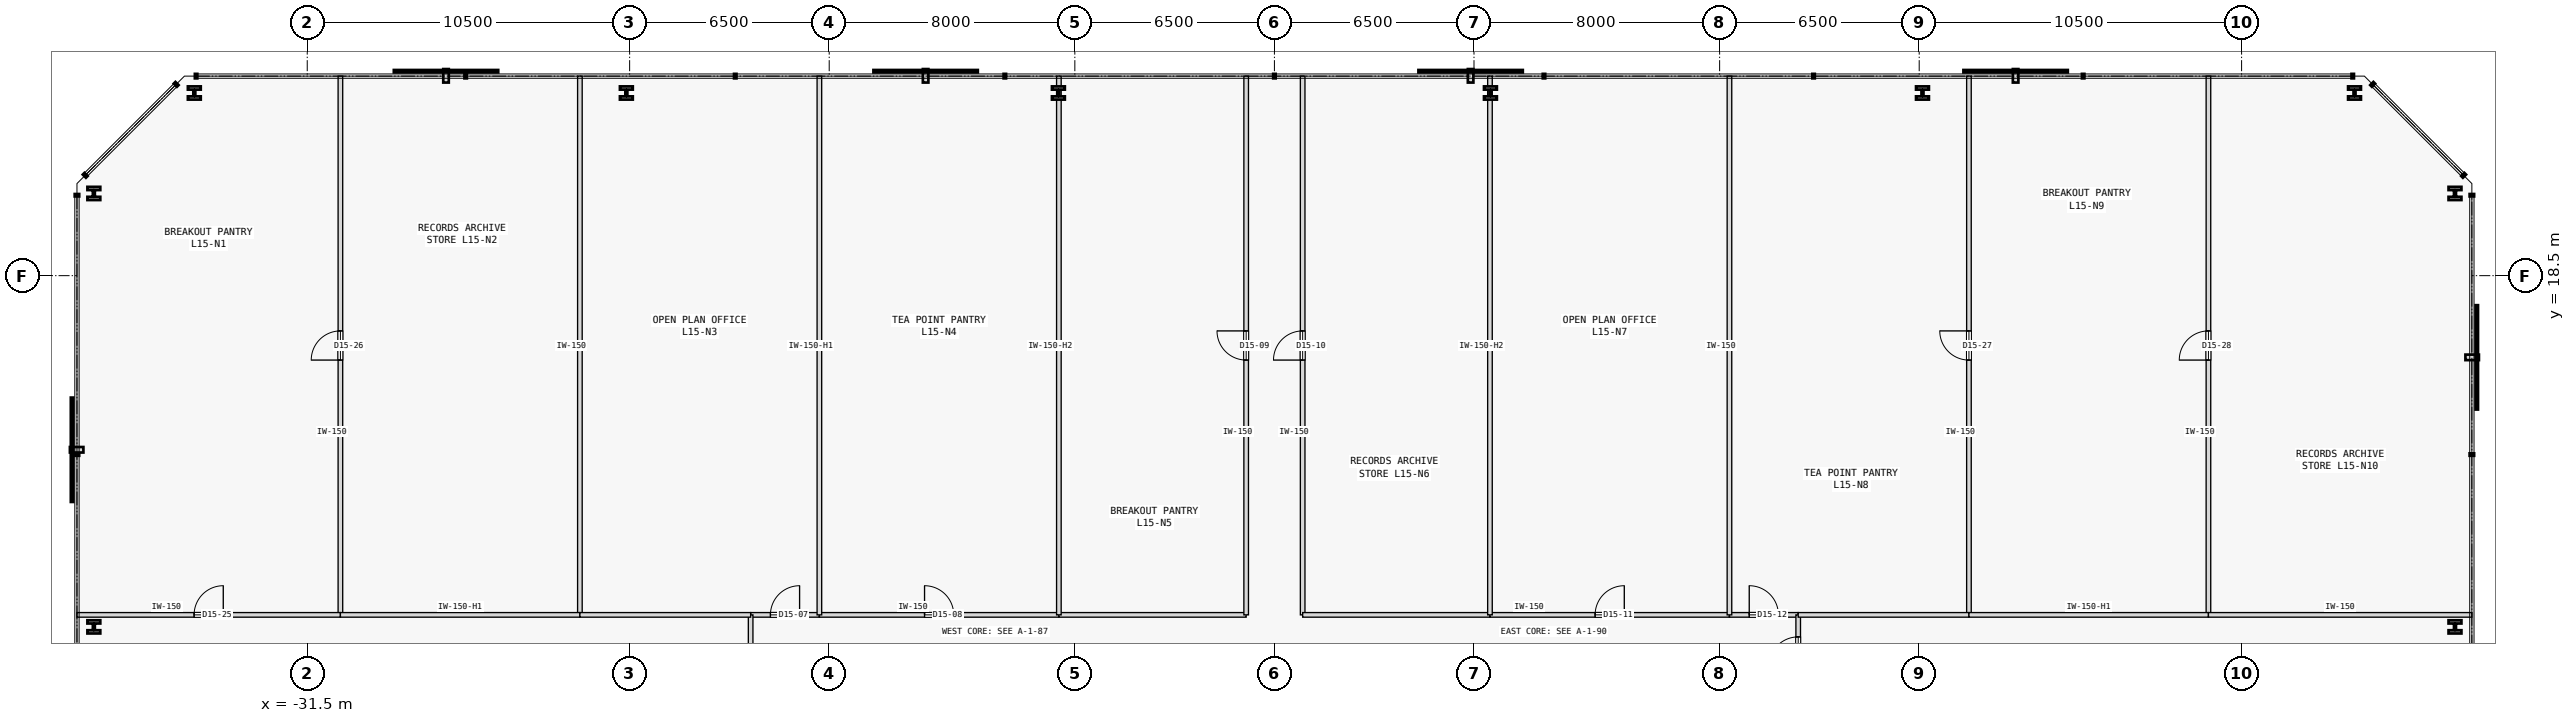
"""IFC4 building model, lengths in metres.
Left out: names, types, materials, properties, quantities, classifications, styles, units other than length and angle.
Written with IfcOpenShell. Run it as: python <this file> out.ifc"""

import sys

from ifc_helpers import new_model, si_unit, direction, frame, frame_2d, origin, origin_2d, place, context, subcontext, project, spatial, rectangle, i_section, extrude, element, fill, save


model = new_model("IFC4")
c1 = context("Model", 3, precision=1e-05, world=origin(), true_north=direction((0.0, 1.0)))
c2 = subcontext(c1, "Body", "Model", "MODEL_VIEW")
j1 = project(units=[si_unit("LENGTHUNIT", "METRE"), si_unit("PLANEANGLEUNIT", "RADIAN")], contexts=[c1])
p1 = place(None, origin())
s1 = spatial("IfcSite", under=j1, at=p1, CompositionType="ELEMENT")
p2 = place(p1, origin())
s2 = spatial("IfcBuilding", under=s1, at=p2, CompositionType="ELEMENT")
p3 = place(p2, frame((0.0, 0.0, 63.6)))
s3 = spatial("IfcBuildingStorey", under=s2, at=p3, CompositionType="ELEMENT", Elevation=63.6)
for number, where, z_axis, x_axis in (
    (1, (38.45, 7.059, 0.0), (0.0, 0.0, 1.0), (1.0, 0.0, 0.0)),
    (2, (38.45, 21.178, 0.0), (0.0, 0.0, 1.0), (1.0, 0.0, 0.0)),
    (3, (35.178, 24.45, 0.0), (0.0, 0.0, 1.0), (1.0, 0.0, 0.0)),
    (4, (21.107, 24.45, 0.0), (0.0, 0.0, 1.0), (1.0, 0.0, 0.0)),
    (5, (7.036, 24.45, 0.0), (0.0, 0.0, 1.0), (1.0, 0.0, 0.0)),
    (6, (-7.036, 24.45, 0.0), (0.0, 0.0, 1.0), (1.0, 0.0, 0.0)),
    (7, (-21.107, 24.45, 0.0), (0.0, 0.0, 1.0), (1.0, 0.0, 0.0)),
    (8, (-35.178, 24.45, 0.0), (0.0, 0.0, 1.0), (1.0, 0.0, 0.0)),
    (9, (-38.45, 21.178, 0.0), (0.0, 0.0, 1.0), (1.0, 0.0, 0.0)),
    (10, (-38.45, 7.059, 0.0), (0.0, 0.0, 1.0), (1.0, 0.0, 0.0)),
):
    element("IfcColumn", number, at=place(p3, frame(where, z_axis=z_axis, x_axis=x_axis)), inside=s3, PredefinedType="COLUMN", context=c2, shape_type="SweptSolid", body=[
        extrude(i_section(OverallWidth=0.42, OverallDepth=0.431, WebThickness=0.065, FlangeThickness=0.106, FilletRadius=0.015, at=origin_2d()), origin(), (0.0, 0.0, 1.0), 3.8),
    ])
p4 = place(p3, frame((-17.059, 7.45, 0.0), z_axis=(0.0, 0.0, 1.0), x_axis=(1.0, 0.0, 0.0)))
e11 = element("IfcWall", 11, at=p4, inside=s3, PredefinedType="PARTITIONING", context=c2, shape_type="SweptSolid", body=[
    extrude(rectangle(XDim=2.239, YDim=0.15, at=frame_2d((1.12, 0.0))), origin(), (0.0, 0.0, 1.0), 3.575),
])
p5 = place(p4, frame((0.645, 0.0, 0.0)))
e12 = element("IfcOpeningElement", 12, at=p5, cuts=e11, PredefinedType="OPENING", context=c2, shape_type="SweptSolid", body=[
    extrude(rectangle(XDim=0.95, YDim=2.15, at=frame_2d((0.475, 1.075))), frame((0.0, 0.085, 0.0), z_axis=(0.0, -1.0, 0.0), x_axis=(1.0, 0.0, 0.0)), (0.0, 0.0, 1.0), 0.17),
])
p6 = place(p3, frame((-14.82, 7.45, 0.0), z_axis=(0.0, 0.0, 1.0), x_axis=(1.0, 0.0, 0.0)))
e13 = element("IfcWall", 13, at=p6, inside=s3, PredefinedType="PARTITIONING", context=c2, shape_type="SweptSolid", body=[
    extrude(rectangle(XDim=7.8, YDim=0.15, at=frame_2d((3.9, 0.0))), origin(), (0.0, 0.0, 1.0), 3.575),
])
p7 = place(p6, frame((3.425, 0.0, 0.0)))
e14 = element("IfcOpeningElement", 14, at=p7, cuts=e13, PredefinedType="OPENING", context=c2, shape_type="SweptSolid", body=[
    extrude(rectangle(XDim=0.95, YDim=2.15, at=frame_2d((0.475, 1.075))), frame((0.0, 0.085, 0.0), z_axis=(0.0, -1.0, 0.0), x_axis=(1.0, 0.0, 0.0)), (0.0, 0.0, 1.0), 0.17),
])
p8 = place(p3, frame((-7.02, 7.45, 0.0), z_axis=(0.0, 0.0, 1.0), x_axis=(1.0, 0.0, 0.0)))
e15 = element("IfcWall", 15, at=p8, inside=s3, PredefinedType="PARTITIONING", context=c2, shape_type="SweptSolid", body=[
    extrude(rectangle(XDim=6.1, YDim=0.15, at=frame_2d((3.05, 0.0))), origin(), (0.0, 0.0, 1.0), 3.575),
])
p9 = place(p3, frame((-0.92, 7.45, 0.0), z_axis=(0.0, 0.0, 1.0), x_axis=(0.0, 1.0, 0.0)))
e16 = element("IfcWall", 16, at=p9, inside=s3, PredefinedType="PARTITIONING", context=c2, shape_type="SweptSolid", body=[
    extrude(rectangle(XDim=17.55, YDim=0.15, at=frame_2d((8.775, 0.0))), origin(), (0.0, 0.0, 1.0), 3.575),
])
p10 = place(p9, frame((8.3, 0.0, 0.0)))
e17 = element("IfcOpeningElement", 17, at=p10, cuts=e16, PredefinedType="OPENING", context=c2, shape_type="SweptSolid", body=[
    extrude(rectangle(XDim=0.95, YDim=2.15, at=frame_2d((0.475, 1.075))), frame((0.0, 0.085, 0.0), z_axis=(0.0, -1.0, 0.0), x_axis=(1.0, 0.0, 0.0)), (0.0, 0.0, 1.0), 0.17),
])
p11 = place(p3, frame((0.92, 7.45, 0.0), z_axis=(0.0, 0.0, 1.0), x_axis=(0.0, 1.0, 0.0)))
e18 = element("IfcWall", 18, at=p11, inside=s3, PredefinedType="PARTITIONING", context=c2, shape_type="SweptSolid", body=[
    extrude(rectangle(XDim=17.55, YDim=0.15, at=frame_2d((8.775, 0.0))), origin(), (0.0, 0.0, 1.0), 3.575),
])
p12 = place(p11, frame((8.3, 0.0, 0.0)))
e19 = element("IfcOpeningElement", 19, at=p12, cuts=e18, PredefinedType="OPENING", context=c2, shape_type="SweptSolid", body=[
    extrude(rectangle(XDim=0.95, YDim=2.15, at=frame_2d((0.475, 1.075))), frame((0.0, 0.085, 0.0), z_axis=(0.0, -1.0, 0.0), x_axis=(1.0, 0.0, 0.0)), (0.0, 0.0, 1.0), 0.17),
])
p13 = place(p3, frame((0.92, 7.45, 0.0), z_axis=(0.0, 0.0, 1.0), x_axis=(1.0, 0.0, 0.0)))
e20 = element("IfcWall", 20, at=p13, inside=s3, PredefinedType="PARTITIONING", context=c2, shape_type="SweptSolid", body=[
    extrude(rectangle(XDim=6.1, YDim=0.15, at=frame_2d((3.05, 0.0))), origin(), (0.0, 0.0, 1.0), 3.575),
])
p14 = place(p3, frame((7.02, 7.45, 0.0), z_axis=(0.0, 0.0, 1.0), x_axis=(1.0, 0.0, 0.0)))
e21 = element("IfcWall", 21, at=p14, inside=s3, PredefinedType="PARTITIONING", context=c2, shape_type="SweptSolid", body=[
    extrude(rectangle(XDim=7.8, YDim=0.15, at=frame_2d((3.9, 0.0))), origin(), (0.0, 0.0, 1.0), 3.575),
])
p15 = place(p14, frame((3.425, 0.0, 0.0)))
e22 = element("IfcOpeningElement", 22, at=p15, cuts=e21, PredefinedType="OPENING", context=c2, shape_type="SweptSolid", body=[
    extrude(rectangle(XDim=0.95, YDim=2.15, at=frame_2d((0.475, 1.075))), frame((0.0, 0.085, 0.0), z_axis=(0.0, -1.0, 0.0), x_axis=(1.0, 0.0, 0.0)), (0.0, 0.0, 1.0), 0.17),
])
p16 = place(p3, frame((14.82, 7.45, 0.0), z_axis=(0.0, 0.0, 1.0), x_axis=(1.0, 0.0, 0.0)))
e23 = element("IfcWall", 23, at=p16, inside=s3, PredefinedType="PARTITIONING", context=c2, shape_type="SweptSolid", body=[
    extrude(rectangle(XDim=2.239, YDim=0.15, at=frame_2d((1.12, 0.0))), origin(), (0.0, 0.0, 1.0), 3.575),
])
p17 = place(p16, frame((0.645, 0.0, 0.0)))
e24 = element("IfcOpeningElement", 24, at=p17, cuts=e23, PredefinedType="OPENING", context=c2, shape_type="SweptSolid", body=[
    extrude(rectangle(XDim=0.95, YDim=2.15, at=frame_2d((0.475, 1.075))), frame((0.0, 0.085, 0.0), z_axis=(0.0, -1.0, 0.0), x_axis=(1.0, 0.0, 0.0)), (0.0, 0.0, 1.0), 0.17),
])
p18 = place(p3, frame((-17.059, 0.92, 0.0), z_axis=(0.0, 0.0, 1.0), x_axis=(0.0, 1.0, 0.0)))
e25 = element("IfcWall", 25, at=p18, inside=s3, PredefinedType="PARTITIONING", context=c2, shape_type="SweptSolid", body=[
    extrude(rectangle(XDim=6.53, YDim=0.15, at=frame_2d((3.265, 0.0))), origin(), (0.0, 0.0, 1.0), 3.575),
])
p19 = place(p3, frame((17.059, 5.066, 0.0), z_axis=(0.0, 0.0, 1.0), x_axis=(0.0, 1.0, 0.0)))
e26 = element("IfcWall", 26, at=p19, inside=s3, PredefinedType="PARTITIONING", context=c2, shape_type="SweptSolid", body=[
    extrude(rectangle(XDim=2.384, YDim=0.15, at=frame_2d((1.192, 0.0))), origin(), (0.0, 0.0, 1.0), 3.575),
])
p20 = place(p19, frame((0.717, 0.0, 0.0)))
e27 = element("IfcOpeningElement", 27, at=p20, cuts=e26, PredefinedType="OPENING", context=c2, shape_type="SweptSolid", body=[
    extrude(rectangle(XDim=0.95, YDim=2.15, at=frame_2d((0.475, 1.075))), frame((0.0, 0.085, 0.0), z_axis=(0.0, -1.0, 0.0), x_axis=(1.0, 0.0, 0.0)), (0.0, 0.0, 1.0), 0.17),
])
p21 = place(p3, frame((-30.42, 7.45, 0.0), z_axis=(0.0, 0.0, 1.0), x_axis=(0.0, 1.0, 0.0)))
e28 = element("IfcWall", 28, at=p21, inside=s3, PredefinedType="PARTITIONING", context=c2, shape_type="SweptSolid", body=[
    extrude(rectangle(XDim=17.55, YDim=0.15, at=frame_2d((8.775, 0.0))), origin(), (0.0, 0.0, 1.0), 3.575),
])
p22 = place(p21, frame((8.3, 0.0, 0.0)))
e29 = element("IfcOpeningElement", 29, at=p22, cuts=e28, PredefinedType="OPENING", context=c2, shape_type="SweptSolid", body=[
    extrude(rectangle(XDim=0.95, YDim=2.15, at=frame_2d((0.475, 1.075))), frame((0.0, 0.085, 0.0), z_axis=(0.0, -1.0, 0.0), x_axis=(1.0, 0.0, 0.0)), (0.0, 0.0, 1.0), 0.17),
])
p23 = place(p3, frame((-39.0, 7.45, 0.0), z_axis=(0.0, 0.0, 1.0), x_axis=(1.0, 0.0, 0.0)))
e30 = element("IfcWall", 30, at=p23, inside=s3, PredefinedType="PARTITIONING", context=c2, shape_type="SweptSolid", body=[
    extrude(rectangle(XDim=8.58, YDim=0.15, at=frame_2d((4.29, 0.0))), origin(), (0.0, 0.0, 1.0), 3.575),
])
p24 = place(p23, frame((3.815, 0.0, 0.0)))
e31 = element("IfcOpeningElement", 31, at=p24, cuts=e30, PredefinedType="OPENING", context=c2, shape_type="SweptSolid", body=[
    extrude(rectangle(XDim=0.95, YDim=2.15, at=frame_2d((0.475, 1.075))), frame((0.0, 0.085, 0.0), z_axis=(0.0, -1.0, 0.0), x_axis=(1.0, 0.0, 0.0)), (0.0, 0.0, 1.0), 0.17),
])
p25 = place(p3, frame((-22.62, 7.45, 0.0), z_axis=(0.0, 0.0, 1.0), x_axis=(0.0, 1.0, 0.0)))
e32 = element("IfcWall", 32, at=p25, inside=s3, PredefinedType="PARTITIONING", context=c2, shape_type="SweptSolid", body=[
    extrude(rectangle(XDim=17.55, YDim=0.15, at=frame_2d((8.775, 0.0))), origin(), (0.0, 0.0, 1.0), 3.575),
])
p26 = place(p3, frame((-30.42, 7.45, 0.0), z_axis=(0.0, 0.0, 1.0), x_axis=(1.0, 0.0, 0.0)))
e33 = element("IfcWall", 33, at=p26, inside=s3, PredefinedType="PARTITIONING", context=c2, shape_type="SweptSolid", body=[
    extrude(rectangle(XDim=7.8, YDim=0.15, at=frame_2d((3.9, 0.0))), origin(), (0.0, 0.0, 1.0), 3.125),
])
p27 = place(p3, frame((-14.82, 7.45, 0.0), z_axis=(0.0, 0.0, 1.0), x_axis=(0.0, 1.0, 0.0)))
e34 = element("IfcWall", 34, at=p27, inside=s3, PredefinedType="PARTITIONING", context=c2, shape_type="SweptSolid", body=[
    extrude(rectangle(XDim=17.55, YDim=0.15, at=frame_2d((8.775, 0.0))), origin(), (0.0, 0.0, 1.0), 3.125),
])
p28 = place(p3, frame((-22.62, 7.45, 0.0), z_axis=(0.0, 0.0, 1.0), x_axis=(1.0, 0.0, 0.0)))
e35 = element("IfcWall", 35, at=p28, inside=s3, PredefinedType="PARTITIONING", context=c2, shape_type="SweptSolid", body=[
    extrude(rectangle(XDim=5.561, YDim=0.15, at=frame_2d((2.781, 0.0))), origin(), (0.0, 0.0, 1.0), 3.575),
])
for number, where, z_axis, x_axis in (
    (36, (-7.02, 7.45, 0.0), (0.0, 0.0, 1.0), (0.0, 1.0, 0.0)),
    (37, (7.02, 7.45, 0.0), (0.0, 0.0, 1.0), (0.0, 1.0, 0.0)),
):
    element("IfcWall", number, at=place(p3, frame(where, z_axis=z_axis, x_axis=x_axis)), inside=s3, PredefinedType="PARTITIONING", context=c2, shape_type="SweptSolid", body=[
        extrude(rectangle(XDim=17.55, YDim=0.15, at=frame_2d((8.775, 0.0))), origin(), (0.0, 0.0, 1.0), 2.975),
    ])
p29 = place(p3, frame((14.82, 7.45, 0.0), z_axis=(0.0, 0.0, 1.0), x_axis=(0.0, 1.0, 0.0)))
e38 = element("IfcWall", 38, at=p29, inside=s3, PredefinedType="PARTITIONING", context=c2, shape_type="SweptSolid", body=[
    extrude(rectangle(XDim=17.55, YDim=0.15, at=frame_2d((8.775, 0.0))), origin(), (0.0, 0.0, 1.0), 3.575),
])
p30 = place(p3, frame((22.62, 7.45, 0.0), z_axis=(0.0, 0.0, 1.0), x_axis=(0.0, 1.0, 0.0)))
e39 = element("IfcWall", 39, at=p30, inside=s3, PredefinedType="PARTITIONING", context=c2, shape_type="SweptSolid", body=[
    extrude(rectangle(XDim=17.55, YDim=0.15, at=frame_2d((8.775, 0.0))), origin(), (0.0, 0.0, 1.0), 3.575),
])
p31 = place(p30, frame((8.3, 0.0, 0.0)))
e40 = element("IfcOpeningElement", 40, at=p31, cuts=e39, PredefinedType="OPENING", context=c2, shape_type="SweptSolid", body=[
    extrude(rectangle(XDim=0.95, YDim=2.15, at=frame_2d((0.475, 1.075))), frame((0.0, 0.085, 0.0), z_axis=(0.0, -1.0, 0.0), x_axis=(1.0, 0.0, 0.0)), (0.0, 0.0, 1.0), 0.17),
])
p32 = place(p3, frame((17.059, 7.45, 0.0), z_axis=(0.0, 0.0, 1.0), x_axis=(1.0, 0.0, 0.0)))
e41 = element("IfcWall", 41, at=p32, inside=s3, PredefinedType="PARTITIONING", context=c2, shape_type="SweptSolid", body=[
    extrude(rectangle(XDim=5.561, YDim=0.15, at=frame_2d((2.781, 0.0))), origin(), (0.0, 0.0, 1.0), 3.575),
])
p33 = place(p3, frame((30.42, 7.45, 0.0), z_axis=(0.0, 0.0, 1.0), x_axis=(0.0, 1.0, 0.0)))
e42 = element("IfcWall", 42, at=p33, inside=s3, PredefinedType="PARTITIONING", context=c2, shape_type="SweptSolid", body=[
    extrude(rectangle(XDim=17.55, YDim=0.15, at=frame_2d((8.775, 0.0))), origin(), (0.0, 0.0, 1.0), 3.575),
])
p34 = place(p33, frame((8.3, 0.0, 0.0)))
e43 = element("IfcOpeningElement", 43, at=p34, cuts=e42, PredefinedType="OPENING", context=c2, shape_type="SweptSolid", body=[
    extrude(rectangle(XDim=0.95, YDim=2.15, at=frame_2d((0.475, 1.075))), frame((0.0, 0.085, 0.0), z_axis=(0.0, -1.0, 0.0), x_axis=(1.0, 0.0, 0.0)), (0.0, 0.0, 1.0), 0.17),
])
p35 = place(p3, frame((22.62, 7.45, 0.0), z_axis=(0.0, 0.0, 1.0), x_axis=(1.0, 0.0, 0.0)))
e44 = element("IfcWall", 44, at=p35, inside=s3, PredefinedType="PARTITIONING", context=c2, shape_type="SweptSolid", body=[
    extrude(rectangle(XDim=7.8, YDim=0.15, at=frame_2d((3.9, 0.0))), origin(), (0.0, 0.0, 1.0), 3.125),
])
p36 = place(p3, frame((30.42, 7.45, 0.0), z_axis=(0.0, 0.0, 1.0), x_axis=(1.0, 0.0, 0.0)))
e45 = element("IfcWall", 45, at=p36, inside=s3, PredefinedType="PARTITIONING", context=c2, shape_type="SweptSolid", body=[
    extrude(rectangle(XDim=8.58, YDim=0.15, at=frame_2d((4.29, 0.0))), origin(), (0.0, 0.0, 1.0), 3.575),
])
p37 = place(p5, origin())
e46 = element("IfcDoor", 46, at=p37, inside=s3, OperationType="SINGLE_SWING_RIGHT", PredefinedType="DOOR", context=c2, shape_type="SweptSolid", body=[
    extrude(rectangle(XDim=0.95, YDim=2.15, at=frame_2d((0.475, 1.075))), frame((0.0, 0.025, 0.0), z_axis=(0.0, -1.0, 0.0), x_axis=(1.0, 0.0, 0.0)), (0.0, 0.0, 1.0), 0.05),
])
fill(e12, e46)
p38 = place(p7, origin())
e47 = element("IfcDoor", 47, at=p38, inside=s3, OperationType="SINGLE_SWING_LEFT", PredefinedType="DOOR", context=c2, shape_type="SweptSolid", body=[
    extrude(rectangle(XDim=0.95, YDim=2.15, at=frame_2d((0.475, 1.075))), frame((0.0, 0.025, 0.0), z_axis=(0.0, -1.0, 0.0), x_axis=(1.0, 0.0, 0.0)), (0.0, 0.0, 1.0), 0.05),
])
fill(e14, e47)
p39 = place(p10, origin())
e48 = element("IfcDoor", 48, at=p39, inside=s3, OperationType="SINGLE_SWING_RIGHT", PredefinedType="DOOR", context=c2, shape_type="SweptSolid", body=[
    extrude(rectangle(XDim=0.95, YDim=2.15, at=frame_2d((0.475, 1.075))), frame((0.0, 0.025, 0.0), z_axis=(0.0, -1.0, 0.0), x_axis=(1.0, 0.0, 0.0)), (0.0, 0.0, 1.0), 0.05),
])
fill(e17, e48)
p40 = place(p12, origin())
e49 = element("IfcDoor", 49, at=p40, inside=s3, OperationType="SINGLE_SWING_LEFT", PredefinedType="DOOR", context=c2, shape_type="SweptSolid", body=[
    extrude(rectangle(XDim=0.95, YDim=2.15, at=frame_2d((0.475, 1.075))), frame((0.0, 0.025, 0.0), z_axis=(0.0, -1.0, 0.0), x_axis=(1.0, 0.0, 0.0)), (0.0, 0.0, 1.0), 0.05),
])
fill(e19, e49)
p41 = place(p15, origin())
e50 = element("IfcDoor", 50, at=p41, inside=s3, OperationType="SINGLE_SWING_RIGHT", PredefinedType="DOOR", context=c2, shape_type="SweptSolid", body=[
    extrude(rectangle(XDim=0.95, YDim=2.15, at=frame_2d((0.475, 1.075))), frame((0.0, 0.025, 0.0), z_axis=(0.0, -1.0, 0.0), x_axis=(1.0, 0.0, 0.0)), (0.0, 0.0, 1.0), 0.05),
])
fill(e22, e50)
p42 = place(p17, origin())
e51 = element("IfcDoor", 51, at=p42, inside=s3, OperationType="SINGLE_SWING_LEFT", PredefinedType="DOOR", context=c2, shape_type="SweptSolid", body=[
    extrude(rectangle(XDim=0.95, YDim=2.15, at=frame_2d((0.475, 1.075))), frame((0.0, 0.025, 0.0), z_axis=(0.0, -1.0, 0.0), x_axis=(1.0, 0.0, 0.0)), (0.0, 0.0, 1.0), 0.05),
])
fill(e24, e51)
p43 = place(p20, origin())
e52 = element("IfcDoor", 52, at=p43, inside=s3, OperationType="SINGLE_SWING_LEFT", PredefinedType="DOOR", context=c2, shape_type="SweptSolid", body=[
    extrude(rectangle(XDim=0.95, YDim=2.15, at=frame_2d((0.475, 1.075))), frame((0.0, 0.025, 0.0), z_axis=(0.0, -1.0, 0.0), x_axis=(1.0, 0.0, 0.0)), (0.0, 0.0, 1.0), 0.05),
])
fill(e27, e52)
p44 = place(p24, origin())
e53 = element("IfcDoor", 53, at=p44, inside=s3, OperationType="SINGLE_SWING_RIGHT", PredefinedType="DOOR", context=c2, shape_type="SweptSolid", body=[
    extrude(rectangle(XDim=0.95, YDim=2.15, at=frame_2d((0.475, 1.075))), frame((0.0, 0.025, 0.0), z_axis=(0.0, -1.0, 0.0), x_axis=(1.0, 0.0, 0.0)), (0.0, 0.0, 1.0), 0.05),
])
fill(e31, e53)
p45 = place(p22, origin())
e54 = element("IfcDoor", 54, at=p45, inside=s3, OperationType="SINGLE_SWING_LEFT", PredefinedType="DOOR", context=c2, shape_type="SweptSolid", body=[
    extrude(rectangle(XDim=0.95, YDim=2.15, at=frame_2d((0.475, 1.075))), frame((0.0, 0.025, 0.0), z_axis=(0.0, -1.0, 0.0), x_axis=(1.0, 0.0, 0.0)), (0.0, 0.0, 1.0), 0.05),
])
fill(e29, e54)
p46 = place(p31, origin())
e55 = element("IfcDoor", 55, at=p46, inside=s3, OperationType="SINGLE_SWING_RIGHT", PredefinedType="DOOR", context=c2, shape_type="SweptSolid", body=[
    extrude(rectangle(XDim=0.95, YDim=2.15, at=frame_2d((0.475, 1.075))), frame((0.0, 0.025, 0.0), z_axis=(0.0, -1.0, 0.0), x_axis=(1.0, 0.0, 0.0)), (0.0, 0.0, 1.0), 0.05),
])
fill(e40, e55)
p47 = place(p34, origin())
e56 = element("IfcDoor", 56, at=p47, inside=s3, OperationType="SINGLE_SWING_LEFT", PredefinedType="DOOR", context=c2, shape_type="SweptSolid", body=[
    extrude(rectangle(XDim=0.95, YDim=2.15, at=frame_2d((0.475, 1.075))), frame((0.0, 0.025, 0.0), z_axis=(0.0, -1.0, 0.0), x_axis=(1.0, 0.0, 0.0)), (0.0, 0.0, 1.0), 0.05),
])
fill(e43, e56)
save(model, sys.argv[1])
